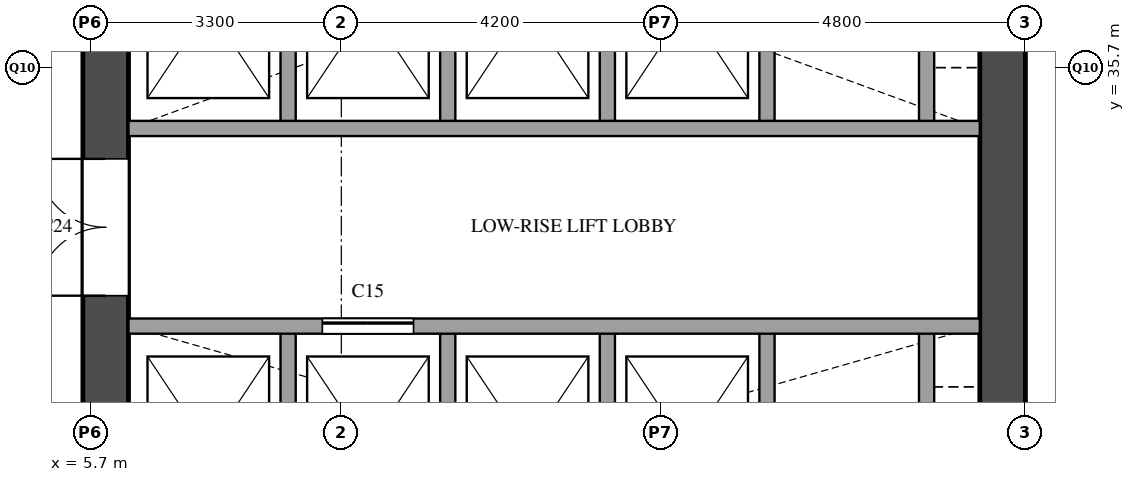
"""IFC4 building model, lengths in metres.
Left out: names, types, materials, properties, quantities, classifications, styles, units other than length and angle.
Written with IfcOpenShell. Run it as: python <this file> out.ifc"""

import sys

from ifc_helpers import new_model, si_unit, direction, frame, frame_2d, origin, place, context, subcontext, project, spatial, rectangle, extrude, element, fill, save


model = new_model("IFC4")
c1 = context("Model", 3, precision=1e-05, world=origin(), true_north=direction((0.0, 1.0)))
c2 = subcontext(c1, "Body", "Model", "MODEL_VIEW")
j1 = project(units=[si_unit("LENGTHUNIT", "METRE"), si_unit("PLANEANGLEUNIT", "RADIAN")], contexts=[c1])
p1 = place(None, origin())
s1 = spatial("IfcSite", under=j1, at=p1, CompositionType="ELEMENT")
p2 = place(p1, origin())
s2 = spatial("IfcBuilding", under=s1, at=p2, CompositionType="ELEMENT")
p3 = place(p2, frame((0.0, 0.0, 46.2)))
s3 = spatial("IfcBuildingStorey", under=s2, at=p3, CompositionType="ELEMENT", Elevation=46.2)
p4 = place(p3, frame((5.9, 29.1, 0.0), z_axis=(0.0, 0.0, 1.0), x_axis=(0.0, 1.0, 0.0)))
e1 = element("IfcWall", 1, at=p4, inside=s3, PredefinedType="SHEAR", context=c2, shape_type="SweptSolid", body=[
    extrude(rectangle(XDim=20.3, YDim=0.6, at=frame_2d((10.15, 0.0))), origin(), (0.0, 0.0, 1.0), 3.5),
])
p5 = place(p4, frame((3.6, 0.0, 0.0)))
e2 = element("IfcOpeningElement", 2, at=p5, cuts=e1, PredefinedType="OPENING", context=c2, shape_type="SweptSolid", body=[
    extrude(rectangle(XDim=1.8, YDim=2.1, at=frame_2d((0.9, 1.05))), frame((0.0, 0.31, 0.0), z_axis=(0.0, -1.0, 0.0), x_axis=(1.0, 0.0, 0.0)), (0.0, 0.0, 1.0), 0.62),
])
p6 = place(p4, frame((16.4, 0.0, 0.0)))
e3 = element("IfcOpeningElement", 3, at=p6, cuts=e1, PredefinedType="OPENING", context=c2, shape_type="SweptSolid", body=[
    extrude(rectangle(XDim=1.0, YDim=2.1, at=frame_2d((0.5, 1.05))), frame((0.0, 0.31, 0.0), z_axis=(0.0, -1.0, 0.0), x_axis=(1.0, 0.0, 0.0)), (0.0, 0.0, 1.0), 0.62),
])
p7 = place(p3, frame((17.7, 29.1, 0.0), z_axis=(0.0, 0.0, 1.0), x_axis=(0.0, 1.0, 0.0)))
e4 = element("IfcWall", 4, at=p7, inside=s3, PredefinedType="SHEAR", context=c2, shape_type="SweptSolid", body=[
    extrude(rectangle(XDim=20.3, YDim=0.6, at=frame_2d((10.15, 0.0))), origin(), (0.0, 0.0, 1.0), 3.5),
])
p8 = place(p7, frame((1.25, 0.0, 0.0)))
e5 = element("IfcOpeningElement", 5, at=p8, cuts=e4, PredefinedType="OPENING", context=c2, shape_type="SweptSolid", body=[
    extrude(rectangle(XDim=0.7, YDim=2.1, at=frame_2d((0.35, 1.05))), frame((0.0, 0.31, 0.0), z_axis=(0.0, -1.0, 0.0), x_axis=(1.0, 0.0, 0.0)), (0.0, 0.0, 1.0), 0.62),
])
p9 = place(p7, frame((7.05, 0.0, 0.0)))
e6 = element("IfcOpeningElement", 6, at=p9, cuts=e4, PredefinedType="OPENING", context=c2, shape_type="SweptSolid", body=[
    extrude(rectangle(XDim=0.7, YDim=2.1, at=frame_2d((0.35, 1.05))), frame((0.0, 0.31, 0.0), z_axis=(0.0, -1.0, 0.0), x_axis=(1.0, 0.0, 0.0)), (0.0, 0.0, 1.0), 0.62),
])
p10 = place(p3, frame((8.3, 29.1, 0.0), z_axis=(0.0, 0.0, 1.0), x_axis=(0.0, 1.0, 0.0)))
e7 = element("IfcWall", 7, at=p10, inside=s3, PredefinedType="SOLIDWALL", context=c2, shape_type="SweptSolid", body=[
    extrude(rectangle(XDim=3.2, YDim=0.2, at=frame_2d((1.6, 0.0))), origin(), (0.0, 0.0, 1.0), 3.5),
])
p11 = place(p3, frame((8.3, 34.9, 0.0), z_axis=(0.0, 0.0, 1.0), x_axis=(0.0, 1.0, 0.0)))
e8 = element("IfcWall", 8, at=p11, inside=s3, PredefinedType="SOLIDWALL", context=c2, shape_type="SweptSolid", body=[
    extrude(rectangle(XDim=3.2, YDim=0.2, at=frame_2d((1.6, 0.0))), origin(), (0.0, 0.0, 1.0), 3.5),
])
p12 = place(p3, frame((10.4, 29.1, 0.0), z_axis=(0.0, 0.0, 1.0), x_axis=(0.0, 1.0, 0.0)))
e9 = element("IfcWall", 9, at=p12, inside=s3, PredefinedType="SOLIDWALL", context=c2, shape_type="SweptSolid", body=[
    extrude(rectangle(XDim=3.2, YDim=0.2, at=frame_2d((1.6, 0.0))), origin(), (0.0, 0.0, 1.0), 3.5),
])
p13 = place(p3, frame((10.4, 34.9, 0.0), z_axis=(0.0, 0.0, 1.0), x_axis=(0.0, 1.0, 0.0)))
e10 = element("IfcWall", 10, at=p13, inside=s3, PredefinedType="SOLIDWALL", context=c2, shape_type="SweptSolid", body=[
    extrude(rectangle(XDim=3.2, YDim=0.2, at=frame_2d((1.6, 0.0))), origin(), (0.0, 0.0, 1.0), 3.5),
])
p14 = place(p3, frame((12.5, 29.1, 0.0), z_axis=(0.0, 0.0, 1.0), x_axis=(0.0, 1.0, 0.0)))
e11 = element("IfcWall", 11, at=p14, inside=s3, PredefinedType="SOLIDWALL", context=c2, shape_type="SweptSolid", body=[
    extrude(rectangle(XDim=3.2, YDim=0.2, at=frame_2d((1.6, 0.0))), origin(), (0.0, 0.0, 1.0), 3.5),
])
p15 = place(p3, frame((12.5, 34.9, 0.0), z_axis=(0.0, 0.0, 1.0), x_axis=(0.0, 1.0, 0.0)))
e12 = element("IfcWall", 12, at=p15, inside=s3, PredefinedType="SOLIDWALL", context=c2, shape_type="SweptSolid", body=[
    extrude(rectangle(XDim=3.2, YDim=0.2, at=frame_2d((1.6, 0.0))), origin(), (0.0, 0.0, 1.0), 3.5),
])
p16 = place(p3, frame((14.6, 29.1, 0.0), z_axis=(0.0, 0.0, 1.0), x_axis=(0.0, 1.0, 0.0)))
e13 = element("IfcWall", 13, at=p16, inside=s3, PredefinedType="SOLIDWALL", context=c2, shape_type="SweptSolid", body=[
    extrude(rectangle(XDim=3.2, YDim=0.2, at=frame_2d((1.6, 0.0))), origin(), (0.0, 0.0, 1.0), 3.5),
])
p17 = place(p3, frame((14.6, 34.9, 0.0), z_axis=(0.0, 0.0, 1.0), x_axis=(0.0, 1.0, 0.0)))
e14 = element("IfcWall", 14, at=p17, inside=s3, PredefinedType="SOLIDWALL", context=c2, shape_type="SweptSolid", body=[
    extrude(rectangle(XDim=3.2, YDim=0.2, at=frame_2d((1.6, 0.0))), origin(), (0.0, 0.0, 1.0), 3.5),
])
p18 = place(p3, frame((16.7, 29.1, 0.0), z_axis=(0.0, 0.0, 1.0), x_axis=(0.0, 1.0, 0.0)))
e15 = element("IfcWall", 15, at=p18, inside=s3, PredefinedType="SOLIDWALL", context=c2, shape_type="SweptSolid", body=[
    extrude(rectangle(XDim=3.2, YDim=0.2, at=frame_2d((1.6, 0.0))), origin(), (0.0, 0.0, 1.0), 3.5),
])
p19 = place(p3, frame((16.7, 34.9, 0.0), z_axis=(0.0, 0.0, 1.0), x_axis=(0.0, 1.0, 0.0)))
e16 = element("IfcWall", 16, at=p19, inside=s3, PredefinedType="SOLIDWALL", context=c2, shape_type="SweptSolid", body=[
    extrude(rectangle(XDim=3.2, YDim=0.2, at=frame_2d((1.6, 0.0))), origin(), (0.0, 0.0, 1.0), 3.5),
])
p20 = place(p3, frame((6.2, 32.3, 0.0), z_axis=(0.0, 0.0, 1.0), x_axis=(1.0, 0.0, 0.0)))
e17 = element("IfcWall", 17, at=p20, inside=s3, PredefinedType="SOLIDWALL", context=c2, shape_type="SweptSolid", body=[
    extrude(rectangle(XDim=11.2, YDim=0.2, at=frame_2d((5.6, 0.0))), origin(), (0.0, 0.0, 1.0), 3.5),
])
p21 = place(p20, frame((2.55, 0.0, 0.0)))
e18 = element("IfcOpeningElement", 18, at=p21, cuts=e17, PredefinedType="OPENING", context=c2, shape_type="SweptSolid", body=[
    extrude(rectangle(XDim=1.2, YDim=2.1, at=frame_2d((0.6, 1.05))), frame((0.0, 0.11, 0.0), z_axis=(0.0, -1.0, 0.0), x_axis=(1.0, 0.0, 0.0)), (0.0, 0.0, 1.0), 0.22),
])
p22 = place(p3, frame((6.2, 34.9, 0.0), z_axis=(0.0, 0.0, 1.0), x_axis=(1.0, 0.0, 0.0)))
e19 = element("IfcWall", 19, at=p22, inside=s3, PredefinedType="SOLIDWALL", context=c2, shape_type="SweptSolid", body=[
    extrude(rectangle(XDim=11.2, YDim=0.2, at=frame_2d((5.6, 0.0))), origin(), (0.0, 0.0, 1.0), 3.5),
])
p23 = place(p21, origin())
e20 = element("IfcDoor", 20, at=p23, inside=s3, OperationType="SLIDING_TO_LEFT", PredefinedType="DOOR", context=c2, shape_type="SweptSolid", body=[
    extrude(rectangle(XDim=1.2, YDim=2.1, at=frame_2d((0.6, 1.05))), frame((0.0, 0.025, 0.0), z_axis=(0.0, -1.0, 0.0), x_axis=(1.0, 0.0, 0.0)), (0.0, 0.0, 1.0), 0.05),
])
fill(e18, e20)
p24 = place(p5, origin())
e21 = element("IfcDoor", 21, at=p24, inside=s3, OperationType="DOUBLE_DOOR_SINGLE_SWING", PredefinedType="DOOR", context=c2, shape_type="SweptSolid", body=[
    extrude(rectangle(XDim=1.8, YDim=2.1, at=frame_2d((0.9, 1.05))), frame((0.0, 0.025, 0.0), z_axis=(0.0, -1.0, 0.0), x_axis=(1.0, 0.0, 0.0)), (0.0, 0.0, 1.0), 0.05),
])
fill(e2, e21)
save(model, sys.argv[1])
